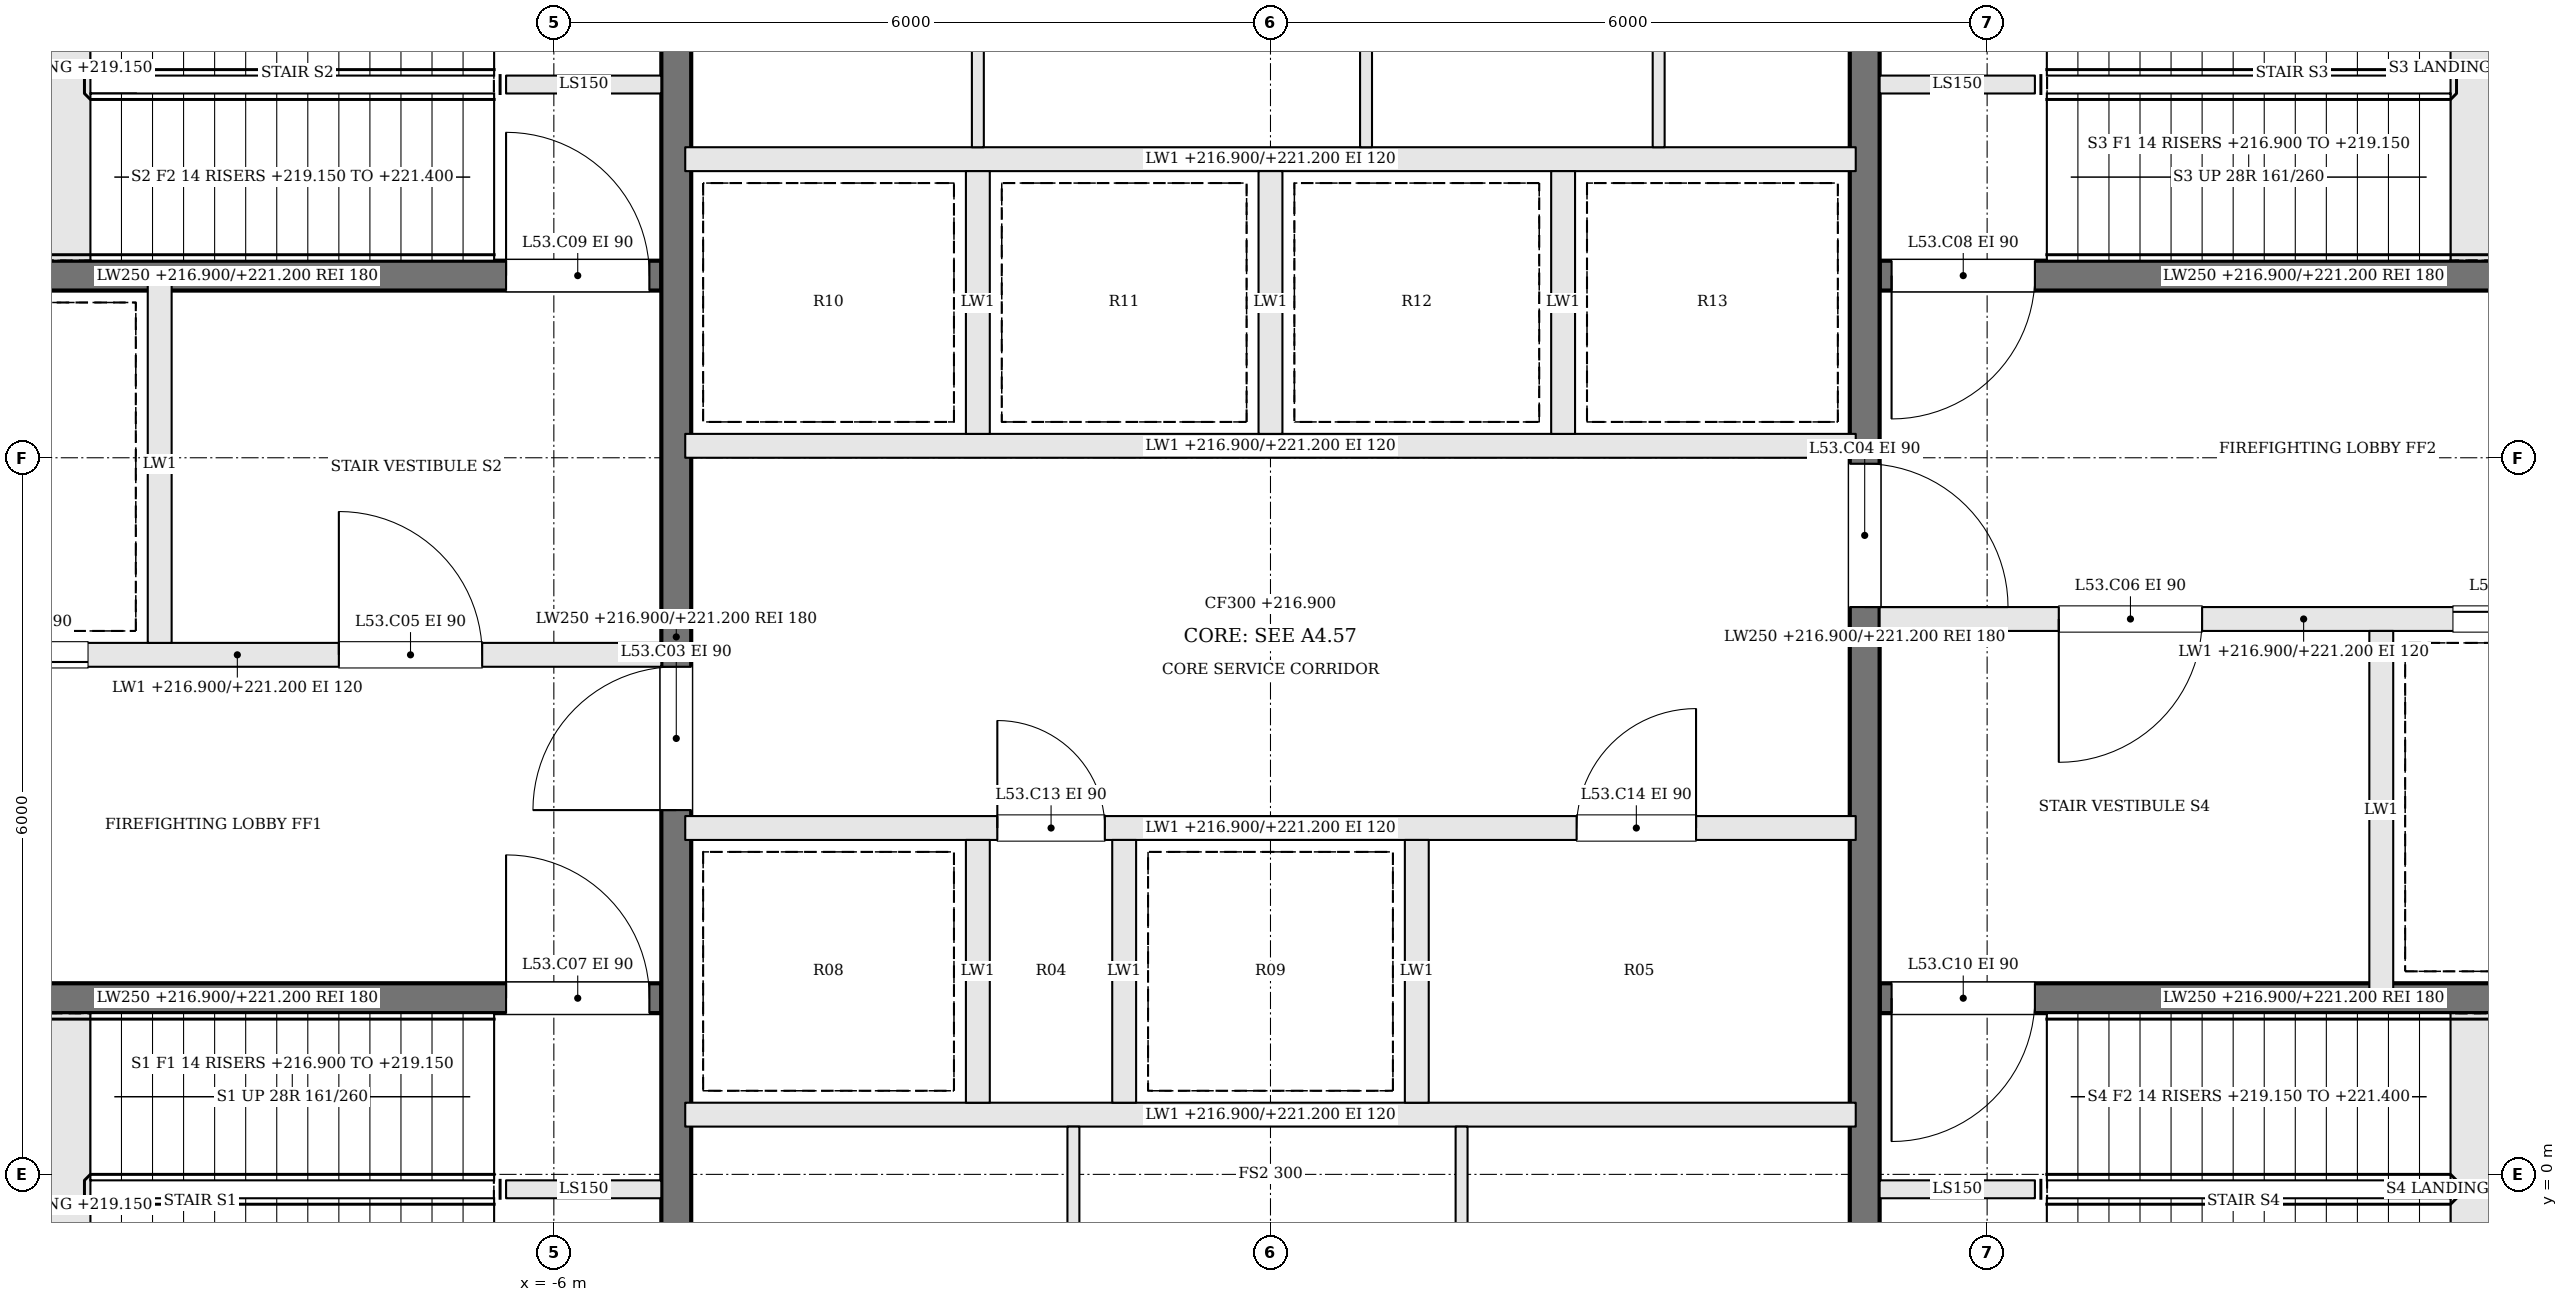
"""IFC4 building model, lengths in metres.
Left out: names, types, materials, properties, quantities, classifications, styles, units other than length and angle.
Written with IfcOpenShell. Run it as: python <this file> out.ifc"""

import sys

from ifc_helpers import new_model, si_unit, direction, frame, frame_2d, origin, place, context, subcontext, project, spatial, rectangle, extrude, element, fill, save


model = new_model("IFC4")
c1 = context("Model", 3, precision=1e-05, world=origin(), true_north=direction((0.0, 1.0)))
c2 = subcontext(c1, "Body", "Model", "MODEL_VIEW")
j1 = project(units=[si_unit("LENGTHUNIT", "METRE"), si_unit("PLANEANGLEUNIT", "RADIAN")], contexts=[c1])
p1 = place(None, origin())
s1 = spatial("IfcSite", under=j1, at=p1, CompositionType="ELEMENT")
p2 = place(p1, origin())
s2 = spatial("IfcBuilding", under=s1, at=p2, CompositionType="ELEMENT")
p3 = place(p2, frame((0.0, 0.0, 216.9)))
s3 = spatial("IfcBuildingStorey", under=s2, at=p3, CompositionType="ELEMENT", Elevation=216.9)
for number, where, z_axis, x_axis in (
    (1, (-6.4, -0.125, 0.0), (0.0, 0.0, 1.0), (1.0, 0.0, 0.0)),
    (2, (6.4, 9.125, 0.0), (0.0, 0.0, 1.0), (-1.0, 0.0, 0.0)),
    (3, (-6.4, 9.125, 0.0), (0.0, 0.0, 1.0), (1.0, 0.0, 0.0)),
    (4, (6.4, -0.125, 0.0), (0.0, 0.0, 1.0), (-1.0, 0.0, 0.0)),
):
    element("IfcWall", number, at=place(p3, frame(where, z_axis=z_axis, x_axis=x_axis)), inside=s3, PredefinedType="SOLIDWALL", context=c2, shape_type="SweptSolid", body=[
        extrude(rectangle(XDim=1.3, YDim=0.15, at=frame_2d((0.65, 0.0))), origin(), (0.0, 0.0, 1.0), 4.3),
    ])
p4 = place(p3, frame((-12.2, 1.475, 0.0), z_axis=(0.0, 0.0, 1.0), x_axis=(1.0, 0.0, 0.0)))
e5 = element("IfcWall", 5, at=p4, inside=s3, PredefinedType="SOLIDWALL", context=c2, shape_type="SweptSolid", body=[
    extrude(rectangle(XDim=7.1, YDim=0.25, at=frame_2d((3.55, 0.0))), origin(), (0.0, 0.0, 1.0), 4.3),
])
p5 = place(p4, frame((5.8, 0.0, 0.0)))
e6 = element("IfcOpeningElement", 6, at=p5, cuts=e5, PredefinedType="OPENING", context=c2, shape_type="SweptSolid", body=[
    extrude(rectangle(XDim=1.2, YDim=2.1, at=frame_2d((0.6, 1.05))), frame((0.0, 0.135, 0.0), z_axis=(0.0, -1.0, 0.0), x_axis=(1.0, 0.0, 0.0)), (0.0, 0.0, 1.0), 0.27),
])
p6 = place(p3, frame((12.2, 7.525, 0.0), z_axis=(0.0, 0.0, 1.0), x_axis=(-1.0, 0.0, 0.0)))
e7 = element("IfcWall", 7, at=p6, inside=s3, PredefinedType="SOLIDWALL", context=c2, shape_type="SweptSolid", body=[
    extrude(rectangle(XDim=7.1, YDim=0.25, at=frame_2d((3.55, 0.0))), origin(), (0.0, 0.0, 1.0), 4.3),
])
p7 = place(p6, frame((5.8, 0.0, 0.0)))
e8 = element("IfcOpeningElement", 8, at=p7, cuts=e7, PredefinedType="OPENING", context=c2, shape_type="SweptSolid", body=[
    extrude(rectangle(XDim=1.2, YDim=2.1, at=frame_2d((0.6, 1.05))), frame((0.0, 0.135, 0.0), z_axis=(0.0, -1.0, 0.0), x_axis=(1.0, 0.0, 0.0)), (0.0, 0.0, 1.0), 0.27),
])
p8 = place(p3, frame((-12.2, 4.35, 0.0), z_axis=(0.0, 0.0, 1.0), x_axis=(1.0, 0.0, 0.0)))
e9 = element("IfcWall", 9, at=p8, inside=s3, PredefinedType="SOLIDWALL", context=c2, shape_type="SweptSolid", body=[
    extrude(rectangle(XDim=7.1, YDim=0.2, at=frame_2d((3.55, 0.0))), origin(), (0.0, 0.0, 1.0), 4.3),
])
p9 = place(p8, frame((4.4, 0.0, 0.0)))
e10 = element("IfcOpeningElement", 10, at=p9, cuts=e9, PredefinedType="OPENING", context=c2, shape_type="SweptSolid", body=[
    extrude(rectangle(XDim=1.2, YDim=2.1, at=frame_2d((0.6, 1.05))), frame((0.0, 0.11, 0.0), z_axis=(0.0, -1.0, 0.0), x_axis=(1.0, 0.0, 0.0)), (0.0, 0.0, 1.0), 0.22),
])
p10 = place(p8, frame((1.1, 0.0, 0.0)))
e11 = element("IfcOpeningElement", 11, at=p10, cuts=e9, PredefinedType="OPENING", context=c2, shape_type="SweptSolid", body=[
    extrude(rectangle(XDim=1.2, YDim=2.1, at=frame_2d((0.6, 1.05))), frame((0.0, 0.11, 0.0), z_axis=(0.0, -1.0, 0.0), x_axis=(1.0, 0.0, 0.0)), (0.0, 0.0, 1.0), 0.22),
])
p11 = place(p3, frame((12.2, 4.65, 0.0), z_axis=(0.0, 0.0, 1.0), x_axis=(-1.0, 0.0, 0.0)))
e12 = element("IfcWall", 12, at=p11, inside=s3, PredefinedType="SOLIDWALL", context=c2, shape_type="SweptSolid", body=[
    extrude(rectangle(XDim=7.1, YDim=0.2, at=frame_2d((3.55, 0.0))), origin(), (0.0, 0.0, 1.0), 4.3),
])
p12 = place(p11, frame((4.4, 0.0, 0.0)))
e13 = element("IfcOpeningElement", 13, at=p12, cuts=e12, PredefinedType="OPENING", context=c2, shape_type="SweptSolid", body=[
    extrude(rectangle(XDim=1.2, YDim=2.1, at=frame_2d((0.6, 1.05))), frame((0.0, 0.11, 0.0), z_axis=(0.0, -1.0, 0.0), x_axis=(1.0, 0.0, 0.0)), (0.0, 0.0, 1.0), 0.22),
])
p13 = place(p11, frame((1.1, 0.0, 0.0)))
e14 = element("IfcOpeningElement", 14, at=p13, cuts=e12, PredefinedType="OPENING", context=c2, shape_type="SweptSolid", body=[
    extrude(rectangle(XDim=1.2, YDim=2.1, at=frame_2d((0.6, 1.05))), frame((0.0, 0.11, 0.0), z_axis=(0.0, -1.0, 0.0), x_axis=(1.0, 0.0, 0.0)), (0.0, 0.0, 1.0), 0.22),
])
p14 = place(p3, frame((-12.2, 7.525, 0.0), z_axis=(0.0, 0.0, 1.0), x_axis=(1.0, 0.0, 0.0)))
e15 = element("IfcWall", 15, at=p14, inside=s3, PredefinedType="SOLIDWALL", context=c2, shape_type="SweptSolid", body=[
    extrude(rectangle(XDim=7.1, YDim=0.25, at=frame_2d((3.55, 0.0))), origin(), (0.0, 0.0, 1.0), 4.3),
])
p15 = place(p14, frame((5.8, 0.0, 0.0)))
e16 = element("IfcOpeningElement", 16, at=p15, cuts=e15, PredefinedType="OPENING", context=c2, shape_type="SweptSolid", body=[
    extrude(rectangle(XDim=1.2, YDim=2.1, at=frame_2d((0.6, 1.05))), frame((0.0, 0.135, 0.0), z_axis=(0.0, -1.0, 0.0), x_axis=(1.0, 0.0, 0.0)), (0.0, 0.0, 1.0), 0.27),
])
p16 = place(p3, frame((12.2, 1.475, 0.0), z_axis=(0.0, 0.0, 1.0), x_axis=(-1.0, 0.0, 0.0)))
e17 = element("IfcWall", 17, at=p16, inside=s3, PredefinedType="SOLIDWALL", context=c2, shape_type="SweptSolid", body=[
    extrude(rectangle(XDim=7.1, YDim=0.25, at=frame_2d((3.55, 0.0))), origin(), (0.0, 0.0, 1.0), 4.3),
])
p17 = place(p16, frame((5.8, 0.0, 0.0)))
e18 = element("IfcOpeningElement", 18, at=p17, cuts=e17, PredefinedType="OPENING", context=c2, shape_type="SweptSolid", body=[
    extrude(rectangle(XDim=1.2, YDim=2.1, at=frame_2d((0.6, 1.05))), frame((0.0, 0.135, 0.0), z_axis=(0.0, -1.0, 0.0), x_axis=(1.0, 0.0, 0.0)), (0.0, 0.0, 1.0), 0.27),
])
for number, where, z_axis, x_axis in (
    (19, (-9.3, 4.45, 0.0), (0.0, 0.0, 1.0), (0.0, 1.0, 0.0)),
    (20, (9.3, 4.55, 0.0), (0.0, 0.0, 1.0), (0.0, -1.0, 0.0)),
):
    element("IfcWall", number, at=place(p3, frame(where, z_axis=z_axis, x_axis=x_axis)), inside=s3, PredefinedType="SOLIDWALL", context=c2, shape_type="SweptSolid", body=[
        extrude(rectangle(XDim=3.0, YDim=0.2, at=frame_2d((1.5, 0.0))), origin(), (0.0, 0.0, 1.0), 4.3),
    ])
p18 = place(p3, frame((-4.975, -2.2, 0.0), z_axis=(0.0, 0.0, 1.0), x_axis=(0.0, 1.0, 0.0)))
e21 = element("IfcWall", 21, at=p18, inside=s3, PredefinedType="SOLIDWALL", context=c2, shape_type="SweptSolid", body=[
    extrude(rectangle(XDim=13.4, YDim=0.25, at=frame_2d((6.7, 0.0))), origin(), (0.0, 0.0, 1.0), 4.3),
])
p19 = place(p18, frame((5.25, 0.0, 0.0)))
e22 = element("IfcOpeningElement", 22, at=p19, cuts=e21, PredefinedType="OPENING", context=c2, shape_type="SweptSolid", body=[
    extrude(rectangle(XDim=1.2, YDim=2.1, at=frame_2d((0.6, 1.05))), frame((0.0, 0.135, 0.0), z_axis=(0.0, -1.0, 0.0), x_axis=(1.0, 0.0, 0.0)), (0.0, 0.0, 1.0), 0.27),
])
p20 = place(p3, frame((4.975, 11.2, 0.0), z_axis=(0.0, 0.0, 1.0), x_axis=(0.0, -1.0, 0.0)))
e23 = element("IfcWall", 23, at=p20, inside=s3, PredefinedType="SOLIDWALL", context=c2, shape_type="SweptSolid", body=[
    extrude(rectangle(XDim=13.4, YDim=0.25, at=frame_2d((6.7, 0.0))), origin(), (0.0, 0.0, 1.0), 4.3),
])
p21 = place(p20, frame((5.25, 0.0, 0.0)))
e24 = element("IfcOpeningElement", 24, at=p21, cuts=e23, PredefinedType="OPENING", context=c2, shape_type="SweptSolid", body=[
    extrude(rectangle(XDim=1.2, YDim=2.1, at=frame_2d((0.6, 1.05))), frame((0.0, 0.135, 0.0), z_axis=(0.0, -1.0, 0.0), x_axis=(1.0, 0.0, 0.0)), (0.0, 0.0, 1.0), 0.27),
])
p22 = place(p3, frame((-4.9, 0.5, 0.0), z_axis=(0.0, 0.0, 1.0), x_axis=(1.0, 0.0, 0.0)))
e25 = element("IfcWall", 25, at=p22, inside=s3, PredefinedType="SOLIDWALL", context=c2, shape_type="SweptSolid", body=[
    extrude(rectangle(XDim=9.8, YDim=0.2, at=frame_2d((4.9, 0.0))), origin(), (0.0, 0.0, 1.0), 4.3),
])
p23 = place(p3, frame((-4.9, 2.9, 0.0), z_axis=(0.0, 0.0, 1.0), x_axis=(1.0, 0.0, 0.0)))
e26 = element("IfcWall", 26, at=p23, inside=s3, PredefinedType="SOLIDWALL", context=c2, shape_type="SweptSolid", body=[
    extrude(rectangle(XDim=9.8, YDim=0.2, at=frame_2d((4.9, 0.0))), origin(), (0.0, 0.0, 1.0), 4.3),
])
p24 = place(p23, frame((2.613, 0.0, 0.0)))
e27 = element("IfcOpeningElement", 27, at=p24, cuts=e26, PredefinedType="OPENING", context=c2, shape_type="SweptSolid", body=[
    extrude(rectangle(XDim=0.9, YDim=2.1, at=frame_2d((0.45, 1.05))), frame((0.0, 0.11, 0.0), z_axis=(0.0, -1.0, 0.0), x_axis=(1.0, 0.0, 0.0)), (0.0, 0.0, 1.0), 0.22),
])
p25 = place(p23, frame((7.463, 0.0, 0.0)))
e28 = element("IfcOpeningElement", 28, at=p25, cuts=e26, PredefinedType="OPENING", context=c2, shape_type="SweptSolid", body=[
    extrude(rectangle(XDim=1.0, YDim=2.1, at=frame_2d((0.5, 1.05))), frame((0.0, 0.11, 0.0), z_axis=(0.0, -1.0, 0.0), x_axis=(1.0, 0.0, 0.0)), (0.0, 0.0, 1.0), 0.22),
])
for number, where, z_axis, x_axis in (
    (29, (-4.9, 6.1, 0.0), (0.0, 0.0, 1.0), (1.0, 0.0, 0.0)),
    (30, (-4.9, 8.5, 0.0), (0.0, 0.0, 1.0), (1.0, 0.0, 0.0)),
):
    element("IfcWall", number, at=place(p3, frame(where, z_axis=z_axis, x_axis=x_axis)), inside=s3, PredefinedType="SOLIDWALL", context=c2, shape_type="SweptSolid", body=[
        extrude(rectangle(XDim=9.8, YDim=0.2, at=frame_2d((4.9, 0.0))), origin(), (0.0, 0.0, 1.0), 4.3),
    ])
for number, where, z_axis, x_axis in (
    (31, (-2.45, 0.6, 0.0), (0.0, 0.0, 1.0), (0.0, 1.0, 0.0)),
    (32, (-1.225, 0.6, 0.0), (0.0, 0.0, 1.0), (0.0, 1.0, 0.0)),
    (33, (1.225, 0.6, 0.0), (0.0, 0.0, 1.0), (0.0, 1.0, 0.0)),
    (34, (-2.45, 6.2, 0.0), (0.0, 0.0, 1.0), (0.0, 1.0, 0.0)),
    (35, (0.0, 6.2, 0.0), (0.0, 0.0, 1.0), (0.0, 1.0, 0.0)),
    (36, (2.45, 6.2, 0.0), (0.0, 0.0, 1.0), (0.0, 1.0, 0.0)),
):
    element("IfcWall", number, at=place(p3, frame(where, z_axis=z_axis, x_axis=x_axis)), inside=s3, PredefinedType="SOLIDWALL", context=c2, shape_type="SweptSolid", body=[
        extrude(rectangle(XDim=2.2, YDim=0.2, at=frame_2d((1.1, 0.0))), origin(), (0.0, 0.0, 1.0), 4.3),
    ])
for number, where, z_axis, x_axis in (
    (37, (-1.65, -2.2, 0.0), (0.0, 0.0, 1.0), (0.0, 1.0, 0.0)),
    (38, (1.6, -2.2, 0.0), (0.0, 0.0, 1.0), (0.0, 1.0, 0.0)),
    (39, (-2.45, 8.6, 0.0), (0.0, 0.0, 1.0), (0.0, 1.0, 0.0)),
    (40, (0.8, 8.6, 0.0), (0.0, 0.0, 1.0), (0.0, 1.0, 0.0)),
    (41, (3.25, 8.6, 0.0), (0.0, 0.0, 1.0), (0.0, 1.0, 0.0)),
):
    element("IfcWall", number, at=place(p3, frame(where, z_axis=z_axis, x_axis=x_axis)), inside=s3, PredefinedType="PARTITIONING", context=c2, shape_type="SweptSolid", body=[
        extrude(rectangle(XDim=2.6, YDim=0.1, at=frame_2d((1.3, 0.0))), origin(), (0.0, 0.0, 1.0), 4.3),
    ])
p26 = place(p19, origin())
e42 = element("IfcDoor", 42, at=p26, inside=s3, OperationType="SINGLE_SWING_LEFT", PredefinedType="DOOR", context=c2, shape_type="SweptSolid", body=[
    extrude(rectangle(XDim=1.2, YDim=2.1, at=frame_2d((0.6, 1.05))), frame((0.0, 0.025, 0.0), z_axis=(0.0, -1.0, 0.0), x_axis=(1.0, 0.0, 0.0)), (0.0, 0.0, 1.0), 0.05),
])
fill(e22, e42)
p27 = place(p21, origin())
e43 = element("IfcDoor", 43, at=p27, inside=s3, OperationType="SINGLE_SWING_RIGHT", PredefinedType="DOOR", context=c2, shape_type="SweptSolid", body=[
    extrude(rectangle(XDim=1.2, YDim=2.1, at=frame_2d((0.6, 1.05))), frame((0.0, 0.025, 0.0), z_axis=(0.0, -1.0, 0.0), x_axis=(1.0, 0.0, 0.0)), (0.0, 0.0, 1.0), 0.05),
])
fill(e24, e43)
p28 = place(p9, origin())
e44 = element("IfcDoor", 44, at=p28, inside=s3, OperationType="SINGLE_SWING_LEFT", PredefinedType="DOOR", context=c2, shape_type="SweptSolid", body=[
    extrude(rectangle(XDim=1.2, YDim=2.1, at=frame_2d((0.6, 1.05))), frame((0.0, 0.025, 0.0), z_axis=(0.0, -1.0, 0.0), x_axis=(1.0, 0.0, 0.0)), (0.0, 0.0, 1.0), 0.05),
])
fill(e10, e44)
p29 = place(p12, origin())
e45 = element("IfcDoor", 45, at=p29, inside=s3, OperationType="SINGLE_SWING_RIGHT", PredefinedType="DOOR", context=c2, shape_type="SweptSolid", body=[
    extrude(rectangle(XDim=1.2, YDim=2.1, at=frame_2d((0.6, 1.05))), frame((0.0, 0.025, 0.0), z_axis=(0.0, -1.0, 0.0), x_axis=(1.0, 0.0, 0.0)), (0.0, 0.0, 1.0), 0.05),
])
fill(e13, e45)
p30 = place(p5, origin())
e46 = element("IfcDoor", 46, at=p30, inside=s3, OperationType="SINGLE_SWING_LEFT", PredefinedType="DOOR", context=c2, shape_type="SweptSolid", body=[
    extrude(rectangle(XDim=1.2, YDim=2.1, at=frame_2d((0.6, 1.05))), frame((0.0, 0.025, 0.0), z_axis=(0.0, -1.0, 0.0), x_axis=(1.0, 0.0, 0.0)), (0.0, 0.0, 1.0), 0.05),
])
fill(e6, e46)
p31 = place(p7, origin())
e47 = element("IfcDoor", 47, at=p31, inside=s3, OperationType="SINGLE_SWING_RIGHT", PredefinedType="DOOR", context=c2, shape_type="SweptSolid", body=[
    extrude(rectangle(XDim=1.2, YDim=2.1, at=frame_2d((0.6, 1.05))), frame((0.0, 0.025, 0.0), z_axis=(0.0, -1.0, 0.0), x_axis=(1.0, 0.0, 0.0)), (0.0, 0.0, 1.0), 0.05),
])
fill(e8, e47)
p32 = place(p15, origin())
e48 = element("IfcDoor", 48, at=p32, inside=s3, OperationType="SINGLE_SWING_LEFT", PredefinedType="DOOR", context=c2, shape_type="SweptSolid", body=[
    extrude(rectangle(XDim=1.2, YDim=2.1, at=frame_2d((0.6, 1.05))), frame((0.0, 0.025, 0.0), z_axis=(0.0, -1.0, 0.0), x_axis=(1.0, 0.0, 0.0)), (0.0, 0.0, 1.0), 0.05),
])
fill(e16, e48)
p33 = place(p17, origin())
e49 = element("IfcDoor", 49, at=p33, inside=s3, OperationType="SINGLE_SWING_RIGHT", PredefinedType="DOOR", context=c2, shape_type="SweptSolid", body=[
    extrude(rectangle(XDim=1.2, YDim=2.1, at=frame_2d((0.6, 1.05))), frame((0.0, 0.025, 0.0), z_axis=(0.0, -1.0, 0.0), x_axis=(1.0, 0.0, 0.0)), (0.0, 0.0, 1.0), 0.05),
])
fill(e18, e49)
p34 = place(p10, origin())
e50 = element("IfcDoor", 50, at=p34, inside=s3, OperationType="SLIDING_TO_RIGHT", PredefinedType="DOOR", context=c2, shape_type="SweptSolid", body=[
    extrude(rectangle(XDim=1.2, YDim=2.1, at=frame_2d((0.6, 1.05))), frame((0.0, 0.025, 0.0), z_axis=(0.0, -1.0, 0.0), x_axis=(1.0, 0.0, 0.0)), (0.0, 0.0, 1.0), 0.05),
])
fill(e11, e50)
p35 = place(p13, origin())
e51 = element("IfcDoor", 51, at=p35, inside=s3, OperationType="SLIDING_TO_RIGHT", PredefinedType="DOOR", context=c2, shape_type="SweptSolid", body=[
    extrude(rectangle(XDim=1.2, YDim=2.1, at=frame_2d((0.6, 1.05))), frame((0.0, 0.025, 0.0), z_axis=(0.0, -1.0, 0.0), x_axis=(1.0, 0.0, 0.0)), (0.0, 0.0, 1.0), 0.05),
])
fill(e14, e51)
p36 = place(p24, origin())
e52 = element("IfcDoor", 52, at=p36, inside=s3, OperationType="SINGLE_SWING_LEFT", PredefinedType="DOOR", context=c2, shape_type="SweptSolid", body=[
    extrude(rectangle(XDim=0.9, YDim=2.1, at=frame_2d((0.45, 1.05))), frame((0.0, 0.025, 0.0), z_axis=(0.0, -1.0, 0.0), x_axis=(1.0, 0.0, 0.0)), (0.0, 0.0, 1.0), 0.05),
])
fill(e27, e52)
p37 = place(p25, origin())
e53 = element("IfcDoor", 53, at=p37, inside=s3, OperationType="SINGLE_SWING_RIGHT", PredefinedType="DOOR", context=c2, shape_type="SweptSolid", body=[
    extrude(rectangle(XDim=1.0, YDim=2.1, at=frame_2d((0.5, 1.05))), frame((0.0, 0.025, 0.0), z_axis=(0.0, -1.0, 0.0), x_axis=(1.0, 0.0, 0.0)), (0.0, 0.0, 1.0), 0.05),
])
fill(e28, e53)
save(model, sys.argv[1])
